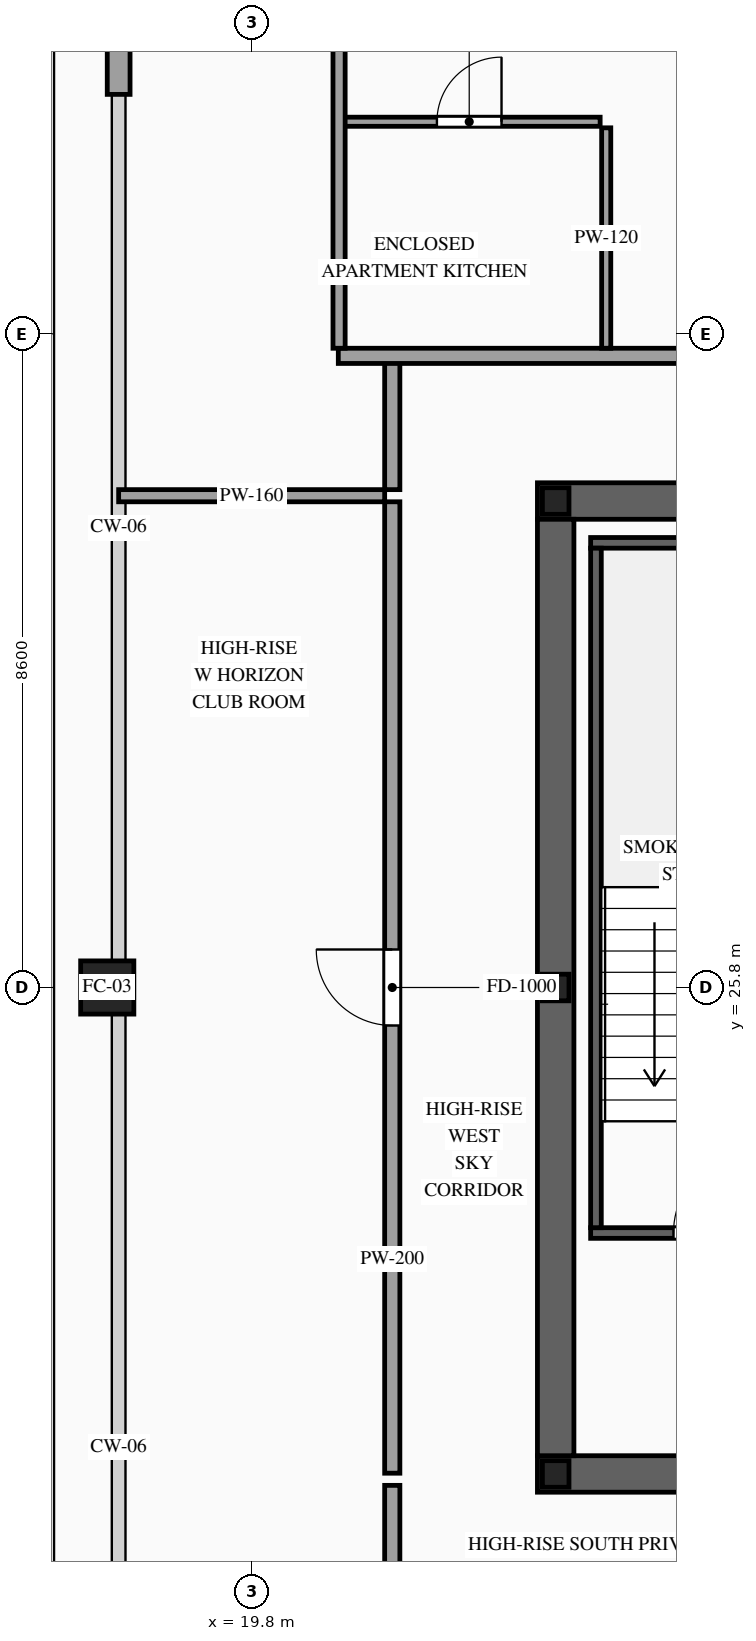
"""IFC4 building model, lengths in metres.
Left out: names, types, materials, properties, quantities, classifications, styles, units other than length and angle.
Written with IfcOpenShell. Run it as: python <this file> out.ifc"""

import sys

from ifc_helpers import new_model, si_unit, direction, frame, frame_2d, origin, origin_2d, place, context, subcontext, project, spatial, rectangle, hollow_rectangle, i_section, extrude, source, transform, mapped, element, fill, save


model = new_model("IFC4")
c1 = context("Model", 3, precision=1e-05, world=origin(), true_north=direction((0.0, 1.0)))
c2 = subcontext(c1, "Body", "Model", "MODEL_VIEW")
j1 = project(units=[si_unit("LENGTHUNIT", "METRE"), si_unit("PLANEANGLEUNIT", "RADIAN")], contexts=[c1])
p1 = place(None, origin())
s1 = spatial("IfcSite", under=j1, at=p1, CompositionType="ELEMENT")
p2 = place(p1, origin())
s2 = spatial("IfcBuilding", under=s1, at=p2, CompositionType="ELEMENT")
p3 = place(p2, frame((0.0, 0.0, 343.2)))
s3 = spatial("IfcBuildingStorey", under=s2, at=p3, CompositionType="ELEMENT", Elevation=343.2)
p4 = place(p3, frame((23.56, 19.4, 0.0), z_axis=(0.0, 0.0, 1.0), x_axis=(1.0, 0.0, 0.0)))
e1 = element("IfcWall", 1, at=p4, inside=s3, PredefinedType="SHEAR", context=c2, shape_type="SweptSolid", body=[
    extrude(rectangle(XDim=26.88, YDim=0.48, at=frame_2d((13.44, 0.0))), origin(), (0.0, 0.0, 1.0), 4.0),
])
p5 = place(p4, frame((1.89, 0.0, 0.0)))
e2 = element("IfcOpeningElement", 2, at=p5, cuts=e1, PredefinedType="OPENING", context=c2, shape_type="SweptSolid", body=[
    extrude(rectangle(XDim=1.1, YDim=2.2, at=frame_2d((0.55, 1.1))), frame((0.0, 0.255, 0.0), z_axis=(0.0, -1.0, 0.0), x_axis=(1.0, 0.0, 0.0)), (0.0, 0.0, 1.0), 0.51),
])
p6 = place(p4, frame((9.79, 0.0, 0.0)))
e3 = element("IfcOpeningElement", 3, at=p6, cuts=e1, PredefinedType="OPENING", context=c2, shape_type="SweptSolid", body=[
    extrude(rectangle(XDim=1.1, YDim=2.2, at=frame_2d((0.55, 1.1))), frame((0.0, 0.255, 0.0), z_axis=(0.0, -1.0, 0.0), x_axis=(1.0, 0.0, 0.0)), (0.0, 0.0, 1.0), 0.51),
])
p7 = place(p4, frame((22.99, 0.0, 0.0)))
e4 = element("IfcOpeningElement", 4, at=p7, cuts=e1, PredefinedType="OPENING", context=c2, shape_type="SweptSolid", body=[
    extrude(rectangle(XDim=1.1, YDim=2.2, at=frame_2d((0.55, 1.1))), frame((0.0, 0.255, 0.0), z_axis=(0.0, -1.0, 0.0), x_axis=(1.0, 0.0, 0.0)), (0.0, 0.0, 1.0), 0.51),
])
p8 = place(p4, frame((19.61, 0.0, 0.0)))
e5 = element("IfcOpeningElement", 5, at=p8, cuts=e1, PredefinedType="OPENING", context=c2, shape_type="SweptSolid", body=[
    extrude(rectangle(XDim=0.9, YDim=2.15, at=frame_2d((0.45, 1.075))), frame((0.0, 0.255, 0.0), z_axis=(0.0, -1.0, 0.0), x_axis=(1.0, 0.0, 0.0)), (0.0, 0.0, 1.0), 0.51),
])
p9 = place(p4, frame((18.17, 0.0, 0.0)))
e6 = element("IfcOpeningElement", 6, at=p9, cuts=e1, PredefinedType="OPENING", context=c2, shape_type="SweptSolid", body=[
    extrude(rectangle(XDim=0.9, YDim=2.15, at=frame_2d((0.45, 1.075))), frame((0.0, 0.255, 0.0), z_axis=(0.0, -1.0, 0.0), x_axis=(1.0, 0.0, 0.0)), (0.0, 0.0, 1.0), 0.51),
])
p10 = place(p3, frame((23.56, 32.2, 0.0), z_axis=(0.0, 0.0, 1.0), x_axis=(1.0, 0.0, 0.0)))
e7 = element("IfcWall", 7, at=p10, inside=s3, PredefinedType="SHEAR", context=c2, shape_type="SweptSolid", body=[
    extrude(rectangle(XDim=26.88, YDim=0.48, at=frame_2d((13.44, 0.0))), origin(), (0.0, 0.0, 1.0), 4.0),
])
p11 = place(p10, frame((4.51, 0.0, 0.0)))
e8 = element("IfcOpeningElement", 8, at=p11, cuts=e7, PredefinedType="OPENING", context=c2, shape_type="SweptSolid", body=[
    extrude(rectangle(XDim=0.9, YDim=2.15, at=frame_2d((0.45, 1.075))), frame((0.0, 0.255, 0.0), z_axis=(0.0, -1.0, 0.0), x_axis=(1.0, 0.0, 0.0)), (0.0, 0.0, 1.0), 0.51),
])
p12 = place(p10, frame((9.79, 0.0, 0.0)))
e9 = element("IfcOpeningElement", 9, at=p12, cuts=e7, PredefinedType="OPENING", context=c2, shape_type="SweptSolid", body=[
    extrude(rectangle(XDim=1.1, YDim=2.2, at=frame_2d((0.55, 1.1))), frame((0.0, 0.255, 0.0), z_axis=(0.0, -1.0, 0.0), x_axis=(1.0, 0.0, 0.0)), (0.0, 0.0, 1.0), 0.51),
])
p13 = place(p10, frame((15.64, 0.0, 0.0)))
e10 = element("IfcOpeningElement", 10, at=p13, cuts=e7, PredefinedType="OPENING", context=c2, shape_type="SweptSolid", body=[
    extrude(rectangle(XDim=1.1, YDim=2.2, at=frame_2d((0.55, 1.1))), frame((0.0, 0.255, 0.0), z_axis=(0.0, -1.0, 0.0), x_axis=(1.0, 0.0, 0.0)), (0.0, 0.0, 1.0), 0.51),
])
p14 = place(p10, frame((18.74, 0.0, 0.0)))
e11 = element("IfcOpeningElement", 11, at=p14, cuts=e7, PredefinedType="OPENING", context=c2, shape_type="SweptSolid", body=[
    extrude(rectangle(XDim=1.1, YDim=2.2, at=frame_2d((0.55, 1.1))), frame((0.0, 0.255, 0.0), z_axis=(0.0, -1.0, 0.0), x_axis=(1.0, 0.0, 0.0)), (0.0, 0.0, 1.0), 0.51),
])
m1 = source(origin(), c2, "Body", "SweptSolid", [
    extrude(rectangle(XDim=12.32, YDim=0.48, at=frame_2d((6.16, 0.0))), origin(), (0.0, 0.0, 1.0), 4.0),
])
p15 = place(p3, frame((23.8, 19.64, 0.0), z_axis=(0.0, 0.0, 1.0), x_axis=(0.0, 1.0, 0.0)))
e12 = element("IfcWall", 12, at=p15, inside=s3, PredefinedType="SHEAR", context=c2, shape_type="MappedRepresentation", body=[
    mapped(m1, transform((0.0, 0.0, 0.0), scale=1.0)),
])
m2 = source(origin(), c2, "Body", "SweptSolid", [
    extrude(i_section(OverallWidth=0.35, OverallDepth=0.35, WebThickness=0.012, FlangeThickness=0.019, at=origin_2d()), origin(), (0.0, 0.0, 1.0), 4.0),
])
for number, where, z_axis, x_axis in (
    (13, (23.8, 19.4, 0.0), (0.0, 0.0, 1.0), (1.0, 0.0, 0.0)),
    (14, (23.8, 25.8, 0.0), (0.0, 0.0, 1.0), (1.0, 0.0, 0.0)),
    (15, (23.8, 32.2, 0.0), (0.0, 0.0, 1.0), (1.0, 0.0, 0.0)),
):
    element("IfcColumn", number, at=place(p3, frame(where, z_axis=z_axis, x_axis=x_axis)), inside=s3, PredefinedType="COLUMN", context=c2, shape_type="MappedRepresentation", body=[
        mapped(m2, transform((0.0, 0.0, 0.0), scale=1.0)),
    ])
m3 = source(origin(), c2, "Body", "SweptSolid", [
    extrude(hollow_rectangle(XDim=0.7, YDim=0.7, WallThickness=0.032, at=origin_2d()), origin(), (0.0, 0.0, 1.0), 4.0),
])
p16 = place(p3, frame((17.9, 25.8, 0.0), z_axis=(0.0, 0.0, 1.0), x_axis=(1.0, 0.0, 0.0)))
e16 = element("IfcColumn", 16, at=p16, inside=s3, PredefinedType="COLUMN", context=c2, shape_type="MappedRepresentation", body=[
    mapped(m3, transform((0.0, 0.0, 0.0), scale=1.0)),
])
m4 = source(origin(), c2, "Body", "SweptSolid", [
    extrude(rectangle(XDim=3.25, YDim=0.3, at=frame_2d((1.625, 0.0))), origin(), (0.0, 0.0, 1.0), 3.365),
])
p17 = place(p3, frame((18.05, 37.55, 0.0), z_axis=(0.0, 0.0, 1.0), x_axis=(0.0, 1.0, 0.0)))
e17 = element("IfcWall", 17, at=p17, inside=s3, PredefinedType="SOLIDWALL", context=c2, shape_type="MappedRepresentation", body=[
    mapped(m4, transform((0.0, 0.0, 0.0), scale=1.0)),
])
p18 = place(p3, frame((24.26, 22.57, 0.0), z_axis=(0.0, 0.0, 1.0), x_axis=(1.0, 0.0, 0.0)))
e18 = element("IfcWall", 18, at=p18, inside=s3, PredefinedType="SOLIDWALL", context=c2, shape_type="SweptSolid", body=[
    extrude(rectangle(XDim=3.28, YDim=0.14, at=frame_2d((1.64, 0.0))), origin(), (0.0, 0.0, 1.0), 3.76),
])
p19 = place(p18, frame((1.09, 0.0, 0.0)))
e19 = element("IfcOpeningElement", 19, at=p19, cuts=e18, PredefinedType="OPENING", context=c2, shape_type="SweptSolid", body=[
    extrude(rectangle(XDim=1.1, YDim=2.2, at=frame_2d((0.55, 1.1))), frame((0.0, 0.085, 0.0), z_axis=(0.0, -1.0, 0.0), x_axis=(1.0, 0.0, 0.0)), (0.0, 0.0, 1.0), 0.17),
])
m5 = source(origin(), c2, "Body", "SweptSolid", [
    extrude(rectangle(XDim=3.28, YDim=0.14, at=frame_2d((1.64, 0.0))), origin(), (0.0, 0.0, 1.0), 3.76),
])
p20 = place(p3, frame((24.26, 31.65, 0.0), z_axis=(0.0, 0.0, 1.0), x_axis=(1.0, 0.0, 0.0)))
e20 = element("IfcWall", 20, at=p20, inside=s3, PredefinedType="SOLIDWALL", context=c2, shape_type="MappedRepresentation", body=[
    mapped(m5, transform((0.0, 0.0, 0.0), scale=1.0)),
])
m6 = source(origin(), c2, "Body", "SweptSolid", [
    extrude(rectangle(XDim=8.94, YDim=0.14, at=frame_2d((4.47, 0.0))), origin(), (0.0, 0.0, 1.0), 3.76),
])
p21 = place(p3, frame((24.33, 22.64, 0.0), z_axis=(0.0, 0.0, 1.0), x_axis=(0.0, 1.0, 0.0)))
e21 = element("IfcWall", 21, at=p21, inside=s3, PredefinedType="SOLIDWALL", context=c2, shape_type="MappedRepresentation", body=[
    mapped(m6, transform((0.0, 0.0, 0.0), scale=1.0)),
])
m7 = source(origin(), c2, "Body", "SweptSolid", [
    extrude(rectangle(XDim=1.7, YDim=0.2, at=frame_2d((0.85, 0.0))), origin(), (0.0, 0.0, 1.0), 3.76),
])
for number, where, z_axis, x_axis in (
    (22, (21.65, 32.35, 0.0), (0.0, 0.0, 1.0), (0.0, 1.0, 0.0)),
    (23, (21.65, 17.55, 0.0), (0.0, 0.0, 1.0), (0.0, 1.0, 0.0)),
):
    element("IfcWall", number, at=place(p3, frame(where, z_axis=z_axis, x_axis=x_axis)), inside=s3, PredefinedType="PARTITIONING", context=c2, shape_type="MappedRepresentation", body=[
        mapped(m7, transform((0.0, 0.0, 0.0), scale=1.0)),
    ])
p22 = place(p3, frame((20.94, 34.11, 0.0), z_axis=(0.0, 0.0, 1.0), x_axis=(1.0, 0.0, 0.0)))
e24 = element("IfcWall", 24, at=p22, inside=s3, PredefinedType="PARTITIONING", context=c2, shape_type="SweptSolid", body=[
    extrude(rectangle(XDim=11.483, YDim=0.2, at=frame_2d((5.742, 0.0))), origin(), (0.0, 0.0, 1.0), 3.76),
])
p23 = place(p22, frame((4.552, 0.0, 0.0)))
e25 = element("IfcOpeningElement", 25, at=p23, cuts=e24, PredefinedType="OPENING", context=c2, shape_type="SweptSolid", body=[
    extrude(rectangle(XDim=1.0, YDim=2.2, at=frame_2d((0.5, 1.1))), frame((0.0, 0.115, 0.0), z_axis=(0.0, -1.0, 0.0), x_axis=(1.0, 0.0, 0.0)), (0.0, 0.0, 1.0), 0.23),
])
p24 = place(p3, frame((20.94, 37.19, 0.0), z_axis=(0.0, 0.0, 1.0), x_axis=(1.0, 0.0, 0.0)))
e26 = element("IfcWall", 26, at=p24, inside=s3, PredefinedType="PARTITIONING", context=c2, shape_type="SweptSolid", body=[
    extrude(rectangle(XDim=3.445, YDim=0.12, at=frame_2d((1.723, 0.0))), origin(), (0.0, 0.0, 1.0), 3.76),
])
p25 = place(p24, frame((1.298, 0.0, 0.0)))
e27 = element("IfcOpeningElement", 27, at=p25, cuts=e26, PredefinedType="OPENING", context=c2, shape_type="SweptSolid", body=[
    extrude(rectangle(XDim=0.85, YDim=2.1, at=frame_2d((0.425, 1.05))), frame((0.0, 0.075, 0.0), z_axis=(0.0, -1.0, 0.0), x_axis=(1.0, 0.0, 0.0)), (0.0, 0.0, 1.0), 0.15),
])
m8 = source(origin(), c2, "Body", "SweptSolid", [
    extrude(rectangle(XDim=2.9, YDim=0.12, at=frame_2d((1.45, 0.0))), origin(), (0.0, 0.0, 1.0), 3.76),
])
p26 = place(p3, frame((24.465, 34.21, 0.0), z_axis=(0.0, 0.0, 1.0), x_axis=(0.0, 1.0, 0.0)))
e28 = element("IfcWall", 28, at=p26, inside=s3, PredefinedType="PARTITIONING", context=c2, shape_type="MappedRepresentation", body=[
    mapped(m8, transform((0.0, 0.0, 0.0), scale=1.0)),
])
m9 = source(origin(), c2, "Body", "SweptSolid", [
    extrude(rectangle(XDim=10.39, YDim=0.16, at=frame_2d((5.195, 0.0))), origin(), (0.0, 0.0, 1.0), 3.76),
])
p27 = place(p3, frame((20.95, 34.21, 0.0), z_axis=(0.0, 0.0, 1.0), x_axis=(0.0, 1.0, 0.0)))
e29 = element("IfcWall", 29, at=p27, inside=s3, PredefinedType="PARTITIONING", context=c2, shape_type="MappedRepresentation", body=[
    mapped(m9, transform((0.0, 0.0, 0.0), scale=1.0)),
])
p28 = place(p3, frame((21.65, 19.41, 0.0), z_axis=(0.0, 0.0, 1.0), x_axis=(0.0, 1.0, 0.0)))
e30 = element("IfcWall", 30, at=p28, inside=s3, PredefinedType="PARTITIONING", context=c2, shape_type="SweptSolid", body=[
    extrude(rectangle(XDim=12.78, YDim=0.2, at=frame_2d((6.39, 0.0))), origin(), (0.0, 0.0, 1.0), 3.76),
])
p29 = place(p28, frame((5.89, 0.0, 0.0)))
e31 = element("IfcOpeningElement", 31, at=p29, cuts=e30, PredefinedType="OPENING", context=c2, shape_type="SweptSolid", body=[
    extrude(rectangle(XDim=1.0, YDim=2.2, at=frame_2d((0.5, 1.1))), frame((0.0, 0.115, 0.0), z_axis=(0.0, -1.0, 0.0), x_axis=(1.0, 0.0, 0.0)), (0.0, 0.0, 1.0), 0.23),
])
m10 = source(origin(), c2, "Body", "SweptSolid", [
    extrude(rectangle(XDim=3.5, YDim=0.16, at=frame_2d((1.75, 0.0))), origin(), (0.0, 0.0, 1.0), 3.305),
])
p30 = place(p3, frame((18.05, 32.27, 0.0), z_axis=(0.0, 0.0, 1.0), x_axis=(1.0, 0.0, 0.0)))
e32 = element("IfcWall", 32, at=p30, inside=s3, PredefinedType="PARTITIONING", context=c2, shape_type="MappedRepresentation", body=[
    mapped(m10, transform((0.0, 0.0, 0.0), scale=1.0)),
])
m11 = source(origin(), c2, "Body", "SweptSolid", [
    extrude(rectangle(XDim=1.1, YDim=2.2, at=frame_2d((0.55, 1.1))), frame((0.0, 0.025, 0.0), z_axis=(0.0, -1.0, 0.0), x_axis=(1.0, 0.0, 0.0)), (0.0, 0.0, 1.0), 0.05),
])
p31 = place(p19, origin())
e33 = element("IfcDoor", 33, at=p31, inside=s3, OperationType="SINGLE_SWING_RIGHT", PredefinedType="DOOR", context=c2, shape_type="MappedRepresentation", body=[
    mapped(m11, transform((0.0, 0.0, 0.0), scale=1.0)),
])
fill(e19, e33)
m12 = source(origin(), c2, "Body", "SweptSolid", [
    extrude(rectangle(XDim=0.85, YDim=2.1, at=frame_2d((0.425, 1.05))), frame((0.0, 0.025, 0.0), z_axis=(0.0, -1.0, 0.0), x_axis=(1.0, 0.0, 0.0)), (0.0, 0.0, 1.0), 0.05),
])
p32 = place(p25, origin())
e34 = element("IfcDoor", 34, at=p32, inside=s3, OperationType="SINGLE_SWING_RIGHT", PredefinedType="DOOR", context=c2, shape_type="MappedRepresentation", body=[
    mapped(m12, transform((0.0, 0.0, 0.0), scale=1.0)),
])
fill(e27, e34)
m13 = source(origin(), c2, "Body", "SweptSolid", [
    extrude(rectangle(XDim=1.0, YDim=2.2, at=frame_2d((0.5, 1.1))), frame((0.0, 0.025, 0.0), z_axis=(0.0, -1.0, 0.0), x_axis=(1.0, 0.0, 0.0)), (0.0, 0.0, 1.0), 0.05),
])
p33 = place(p29, origin())
e35 = element("IfcDoor", 35, at=p33, inside=s3, OperationType="SINGLE_SWING_RIGHT", PredefinedType="DOOR", context=c2, shape_type="MappedRepresentation", body=[
    mapped(m13, transform((0.0, 0.0, 0.0), scale=1.0)),
])
fill(e31, e35)
save(model, sys.argv[1])
